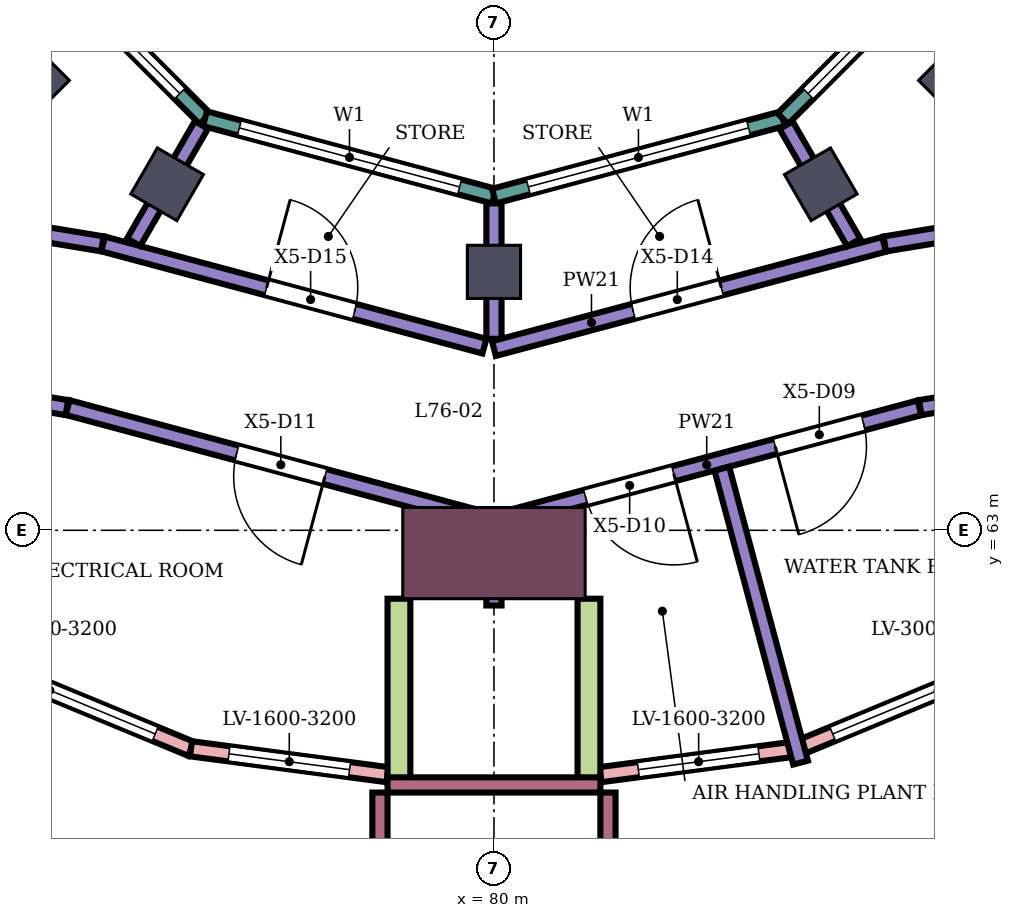
"""IFC4 building model, lengths in metres.
Left out: names, types, materials, properties, quantities, classifications, styles, units other than length and angle.
Written with IfcOpenShell. Run it as: python <this file> out.ifc"""

import sys

from ifc_helpers import new_model, si_unit, direction, frame, frame_2d, origin, origin_2d, place, context, subcontext, project, spatial, rectangle, extrude, element, fill, save


model = new_model("IFC4")
c1 = context("Model", 3, precision=1e-05, world=origin(), true_north=direction((0.0, 1.0)))
c2 = subcontext(c1, "Body", "Model", "MODEL_VIEW")
j1 = project(units=[si_unit("LENGTHUNIT", "METRE"), si_unit("PLANEANGLEUNIT", "RADIAN")], contexts=[c1])
p1 = place(None, origin())
s1 = spatial("IfcSite", under=j1, at=p1, CompositionType="ELEMENT")
p2 = place(p1, origin())
s2 = spatial("IfcBuilding", under=s1, at=p2, CompositionType="ELEMENT")
p3 = place(p2, frame((0.0, 0.0, 333.1)))
s3 = spatial("IfcBuildingStorey", under=s2, at=p3, CompositionType="ELEMENT", Elevation=333.1)
for number, where, z_axis, x_axis in (
    (1, (73.919, 68.919, 0.0), (0.0, 0.0, 1.0), (-0.707, -0.707, 0.0)),
    (2, (75.7, 67.552, 0.0), (0.0, 0.0, 1.0), (-0.5, -0.866, 0.0)),
    (3, (80.0, 66.4, 0.0), (0.0, 0.0, 1.0), (0.0, -1.0, 0.0)),
    (4, (84.3, 67.552, 0.0), (0.0, 0.0, 1.0), (0.5, -0.866, 0.0)),
    (5, (86.081, 68.919, 0.0), (0.0, 0.0, 1.0), (0.707, -0.707, 0.0)),
):
    element("IfcColumn", number, at=place(p3, frame(where, z_axis=z_axis, x_axis=x_axis)), inside=s3, PredefinedType="COLUMN", context=c2, shape_type="SweptSolid", body=[
        extrude(rectangle(XDim=0.7, YDim=0.7, at=origin_2d()), origin(), (0.0, 0.0, 1.0), 4.5),
    ])
p4 = place(p3, frame((80.0, 62.7, 0.0), z_axis=(0.0, 0.0, 1.0), x_axis=(0.0, -1.0, 0.0)))
e6 = element("IfcColumn", 6, at=p4, inside=s3, PredefinedType="COLUMN", context=c2, shape_type="SweptSolid", body=[
    extrude(rectangle(XDim=1.2, YDim=2.4, at=origin_2d()), origin(), (0.0, 0.0, 1.0), 4.5),
])
p5 = place(p3, frame((72.301, 61.664, 0.0), z_axis=(0.0, 0.0, 1.0), x_axis=(0.923858417842, -0.38273440371, 0.0)))
e7 = element("IfcWall", 7, at=p5, inside=s3, PredefinedType="NOTDEFINED", context=c2, shape_type="SweptSolid", body=[
    extrude(rectangle(XDim=4.02, YDim=0.2, at=frame_2d((2.01, 0.0))), origin(), (0.0, 0.0, 1.0), 4.5),
])
p6 = place(p5, frame((0.51, 0.0, 0.5)))
e8 = element("IfcOpeningElement", 8, at=p6, cuts=e7, PredefinedType="OPENING", context=c2, shape_type="SweptSolid", body=[
    extrude(rectangle(XDim=3.0, YDim=3.2, at=frame_2d((1.5, 1.6))), frame((0.0, 0.11, 0.0), z_axis=(0.0, -1.0, 0.0), x_axis=(1.0, 0.0, 0.0)), (0.0, 0.0, 1.0), 0.22),
])
p7 = place(p3, frame((76.014, 60.125, 0.0), z_axis=(0.0, 0.0, 1.0), x_axis=(0.991448878041, -0.130495678972, 0.0)))
e9 = element("IfcWall", 9, at=p7, inside=s3, PredefinedType="NOTDEFINED", context=c2, shape_type="SweptSolid", body=[
    extrude(rectangle(XDim=2.608, YDim=0.2, at=frame_2d((1.304, 0.0))), origin(), (0.0, 0.0, 1.0), 4.5),
])
p8 = place(p7, frame((0.504, 0.0, 0.5)))
e10 = element("IfcOpeningElement", 10, at=p8, cuts=e9, PredefinedType="OPENING", context=c2, shape_type="SweptSolid", body=[
    extrude(rectangle(XDim=1.6, YDim=3.2, at=frame_2d((0.8, 1.6))), frame((0.0, 0.11, 0.0), z_axis=(0.0, -1.0, 0.0), x_axis=(1.0, 0.0, 0.0)), (0.0, 0.0, 1.0), 0.22),
])
p9 = place(p3, frame((81.4, 59.785, 0.0), z_axis=(0.0, 0.0, 1.0), x_axis=(0.991448878041, 0.130495678972, 0.0)))
e11 = element("IfcWall", 11, at=p9, inside=s3, PredefinedType="NOTDEFINED", context=c2, shape_type="SweptSolid", body=[
    extrude(rectangle(XDim=2.608, YDim=0.2, at=frame_2d((1.304, 0.0))), origin(), (0.0, 0.0, 1.0), 4.5),
])
p10 = place(p9, frame((0.504, 0.0, 0.5)))
e12 = element("IfcOpeningElement", 12, at=p10, cuts=e11, PredefinedType="OPENING", context=c2, shape_type="SweptSolid", body=[
    extrude(rectangle(XDim=1.6, YDim=3.2, at=frame_2d((0.8, 1.6))), frame((0.0, 0.11, 0.0), z_axis=(0.0, -1.0, 0.0), x_axis=(1.0, 0.0, 0.0)), (0.0, 0.0, 1.0), 0.22),
])
p11 = place(p3, frame((83.986, 60.125, 0.0), z_axis=(0.0, 0.0, 1.0), x_axis=(0.923858417842, 0.38273440371, 0.0)))
e13 = element("IfcWall", 13, at=p11, inside=s3, PredefinedType="NOTDEFINED", context=c2, shape_type="SweptSolid", body=[
    extrude(rectangle(XDim=4.02, YDim=0.2, at=frame_2d((2.01, 0.0))), origin(), (0.0, 0.0, 1.0), 4.5),
])
p12 = place(p11, frame((0.51, 0.0, 0.5)))
e14 = element("IfcOpeningElement", 14, at=p12, cuts=e13, PredefinedType="OPENING", context=c2, shape_type="SweptSolid", body=[
    extrude(rectangle(XDim=3.0, YDim=3.2, at=frame_2d((1.5, 1.6))), frame((0.0, 0.11, 0.0), z_axis=(0.0, -1.0, 0.0), x_axis=(1.0, 0.0, 0.0)), (0.0, 0.0, 1.0), 0.22),
])
for number, where, z_axis, x_axis in (
    (15, (78.75, 62.1, 0.0), (0.0, 0.0, 1.0), (0.0, -1.0, 0.0)),
    (16, (81.25, 62.1, 0.0), (0.0, 0.0, 1.0), (0.0, -1.0, 0.0)),
):
    element("IfcWall", number, at=place(p3, frame(where, z_axis=z_axis, x_axis=x_axis)), inside=s3, PredefinedType="NOTDEFINED", context=c2, shape_type="SweptSolid", body=[
        extrude(rectangle(XDim=2.416, YDim=0.3, at=frame_2d((1.208, 0.0))), origin(), (0.0, 0.0, 1.0), 4.5),
    ])
p13 = place(p3, frame((73.415, 71.198, 0.0), z_axis=(0.0, 0.0, 1.0), x_axis=(0.707106781187, -0.707106781187, 0.0)))
e17 = element("IfcWall", 17, at=p13, inside=s3, PredefinedType="NOTDEFINED", context=c2, shape_type="SweptSolid", body=[
    extrude(rectangle(XDim=3.936, YDim=0.2, at=frame_2d((1.968, 0.0))), origin(), (0.0, 0.0, 1.0), 4.5),
])
p14 = place(p13, frame((0.468, 0.0, 0.9)))
e18 = element("IfcOpeningElement", 18, at=p14, cuts=e17, PredefinedType="OPENING", context=c2, shape_type="SweptSolid", body=[
    extrude(rectangle(XDim=3.0, YDim=2.3, at=frame_2d((1.5, 1.15))), frame((0.0, 0.11, 0.0), z_axis=(0.0, -1.0, 0.0), x_axis=(1.0, 0.0, 0.0)), (0.0, 0.0, 1.0), 0.22),
])
p15 = place(p3, frame((76.198, 68.415, 0.0), z_axis=(0.0, 0.0, 1.0), x_axis=(0.965933654434, -0.258789828301, 0.0)))
e19 = element("IfcWall", 19, at=p15, inside=s3, PredefinedType="NOTDEFINED", context=c2, shape_type="SweptSolid", body=[
    extrude(rectangle(XDim=3.936, YDim=0.2, at=frame_2d((1.968, 0.0))), origin(), (0.0, 0.0, 1.0), 4.5),
])
p16 = place(p15, frame((0.468, 0.0, 0.9)))
e20 = element("IfcOpeningElement", 20, at=p16, cuts=e19, PredefinedType="OPENING", context=c2, shape_type="SweptSolid", body=[
    extrude(rectangle(XDim=3.0, YDim=2.3, at=frame_2d((1.5, 1.15))), frame((0.0, 0.11, 0.0), z_axis=(0.0, -1.0, 0.0), x_axis=(1.0, 0.0, 0.0)), (0.0, 0.0, 1.0), 0.22),
])
p17 = place(p3, frame((80.0, 67.396, 0.0), z_axis=(0.0, 0.0, 1.0), x_axis=(0.965933654434, 0.258789828301, 0.0)))
e21 = element("IfcWall", 21, at=p17, inside=s3, PredefinedType="NOTDEFINED", context=c2, shape_type="SweptSolid", body=[
    extrude(rectangle(XDim=3.936, YDim=0.2, at=frame_2d((1.968, 0.0))), origin(), (0.0, 0.0, 1.0), 4.5),
])
p18 = place(p17, frame((0.468, 0.0, 0.9)))
e22 = element("IfcOpeningElement", 22, at=p18, cuts=e21, PredefinedType="OPENING", context=c2, shape_type="SweptSolid", body=[
    extrude(rectangle(XDim=3.0, YDim=2.3, at=frame_2d((1.5, 1.15))), frame((0.0, 0.11, 0.0), z_axis=(0.0, -1.0, 0.0), x_axis=(1.0, 0.0, 0.0)), (0.0, 0.0, 1.0), 0.22),
])
p19 = place(p3, frame((83.802, 68.415, 0.0), z_axis=(0.0, 0.0, 1.0), x_axis=(0.707106781187, 0.707106781187, 0.0)))
e23 = element("IfcWall", 23, at=p19, inside=s3, PredefinedType="NOTDEFINED", context=c2, shape_type="SweptSolid", body=[
    extrude(rectangle(XDim=3.936, YDim=0.2, at=frame_2d((1.968, 0.0))), origin(), (0.0, 0.0, 1.0), 4.5),
])
p20 = place(p19, frame((0.468, 0.0, 0.9)))
e24 = element("IfcOpeningElement", 24, at=p20, cuts=e23, PredefinedType="OPENING", context=c2, shape_type="SweptSolid", body=[
    extrude(rectangle(XDim=3.0, YDim=2.3, at=frame_2d((1.5, 1.15))), frame((0.0, 0.11, 0.0), z_axis=(0.0, -1.0, 0.0), x_axis=(1.0, 0.0, 0.0)), (0.0, 0.0, 1.0), 0.22),
])
p21 = place(p3, frame((88.836, 59.668, 0.0), z_axis=(0.0, 0.0, 1.0), x_axis=(-0.923884687805, -0.382670986147, 0.0)))
e25 = element("IfcWall", 25, at=p21, inside=s3, PredefinedType="PARAPET", context=c2, shape_type="SweptSolid", body=[
    extrude(rectangle(XDim=4.594, YDim=0.2, at=frame_2d((2.297, 0.0))), origin(), (0.0, 0.0, 1.0), 1.1),
])
p22 = place(p3, frame((81.5, 57.614, 0.0), z_axis=(0.0, 0.0, 1.0), x_axis=(0.0, 1.0, 0.0)))
e26 = element("IfcWall", 26, at=p22, inside=s3, PredefinedType="PARAPET", context=c2, shape_type="SweptSolid", body=[
    extrude(rectangle(XDim=1.936, YDim=0.2, at=frame_2d((0.968, 0.0))), origin(), (0.0, 0.0, 1.0), 1.1),
])
p23 = place(p3, frame((81.4, 59.65, 0.0), z_axis=(0.0, 0.0, 1.0), x_axis=(-1.0, 0.0, 0.0)))
e27 = element("IfcWall", 27, at=p23, inside=s3, PredefinedType="PARAPET", context=c2, shape_type="SweptSolid", body=[
    extrude(rectangle(XDim=2.8, YDim=0.2, at=frame_2d((1.4, 0.0))), origin(), (0.0, 0.0, 1.0), 1.1),
])
p24 = place(p3, frame((78.5, 59.55, 0.0), z_axis=(0.0, 0.0, 1.0), x_axis=(0.0, -1.0, 0.0)))
e28 = element("IfcWall", 28, at=p24, inside=s3, PredefinedType="PARAPET", context=c2, shape_type="SweptSolid", body=[
    extrude(rectangle(XDim=1.936, YDim=0.2, at=frame_2d((0.968, 0.0))), origin(), (0.0, 0.0, 1.0), 1.1),
])
p25 = place(p3, frame((75.407, 57.911, 0.0), z_axis=(0.0, 0.0, 1.0), x_axis=(-0.923884687805, 0.382670986147, 0.0)))
e29 = element("IfcWall", 29, at=p25, inside=s3, PredefinedType="PARAPET", context=c2, shape_type="SweptSolid", body=[
    extrude(rectangle(XDim=4.594, YDim=0.2, at=frame_2d((2.297, 0.0))), origin(), (0.0, 0.0, 1.0), 1.1),
])
p26 = place(p3, frame((71.716, 65.058, 0.0), z_axis=(0.0, 0.0, 1.0), x_axis=(0.986393923832, -0.164398987305, 0.0)))
e30 = element("IfcWall", 30, at=p26, inside=s3, PredefinedType="PARTITIONING", context=c2, shape_type="SweptSolid", body=[
    extrude(rectangle(XDim=2.703, YDim=0.2, at=frame_2d((1.352, 0.0))), origin(), (0.0, 0.0, 1.0), 4.05),
])
p27 = place(p26, frame((0.757, 0.0, 0.0)))
e31 = element("IfcOpeningElement", 31, at=p27, cuts=e30, PredefinedType="OPENING", context=c2, shape_type="SweptSolid", body=[
    extrude(rectangle(XDim=1.2, YDim=2.4, at=frame_2d((0.6, 1.2))), frame((0.0, 0.11, 0.0), z_axis=(0.0, -1.0, 0.0), x_axis=(1.0, 0.0, 0.0)), (0.0, 0.0, 1.0), 0.22),
])
p28 = place(p3, frame((72.1, 67.222, 0.0), z_axis=(0.0, 0.0, 1.0), x_axis=(0.986662669858, -0.162778302943, 0.0)))
e32 = element("IfcWall", 32, at=p28, inside=s3, PredefinedType="PARTITIONING", context=c2, shape_type="SweptSolid", body=[
    extrude(rectangle(XDim=2.785, YDim=0.2, at=frame_2d((1.393, 0.0))), origin(), (0.0, 0.0, 1.0), 4.05),
])
p29 = place(p28, frame((0.798, 0.0, 0.0)))
e33 = element("IfcOpeningElement", 33, at=p29, cuts=e32, PredefinedType="OPENING", context=c2, shape_type="SweptSolid", body=[
    extrude(rectangle(XDim=1.2, YDim=2.4, at=frame_2d((0.6, 1.2))), frame((0.0, 0.11, 0.0), z_axis=(0.0, -1.0, 0.0), x_axis=(1.0, 0.0, 0.0)), (0.0, 0.0, 1.0), 0.22),
])
p30 = place(p3, frame((74.392, 64.615, 0.0), z_axis=(0.0, 0.0, 1.0), x_axis=(0.965852483565, -0.259092608911, 0.0)))
e34 = element("IfcWall", 34, at=p30, inside=s3, PredefinedType="PARTITIONING", context=c2, shape_type="SweptSolid", body=[
    extrude(rectangle(XDim=5.716, YDim=0.2, at=frame_2d((2.858, 0.0))), origin(), (0.0, 0.0, 1.0), 4.05),
])
p31 = place(p30, frame((2.303, 0.0, 0.0)))
e35 = element("IfcOpeningElement", 35, at=p31, cuts=e34, PredefinedType="OPENING", context=c2, shape_type="SweptSolid", body=[
    extrude(rectangle(XDim=1.2, YDim=2.4, at=frame_2d((0.6, 1.2))), frame((0.0, 0.11, 0.0), z_axis=(0.0, -1.0, 0.0), x_axis=(1.0, 0.0, 0.0)), (0.0, 0.0, 1.0), 0.22),
])
p32 = place(p3, frame((74.858, 66.767, 0.0), z_axis=(0.0, 0.0, 1.0), x_axis=(0.965911957735, -0.258870797705, 0.0)))
e36 = element("IfcWall", 36, at=p32, inside=s3, PredefinedType="PARTITIONING", context=c2, shape_type="SweptSolid", body=[
    extrude(rectangle(XDim=5.194, YDim=0.2, at=frame_2d((2.597, 0.0))), origin(), (0.0, 0.0, 1.0), 4.05),
])
p33 = place(p32, frame((2.226, 0.0, 0.0)))
e37 = element("IfcOpeningElement", 37, at=p33, cuts=e36, PredefinedType="OPENING", context=c2, shape_type="SweptSolid", body=[
    extrude(rectangle(XDim=1.2, YDim=2.4, at=frame_2d((0.6, 1.2))), frame((0.0, 0.11, 0.0), z_axis=(0.0, -1.0, 0.0), x_axis=(1.0, 0.0, 0.0)), (0.0, 0.0, 1.0), 0.22),
])
p34 = place(p3, frame((75.26, 66.79, 0.0), z_axis=(0.0, 0.0, 1.0), x_axis=(0.500058459303, 0.865991649659, 0.0)))
e38 = element("IfcWall", 38, at=p34, inside=s3, PredefinedType="PARTITIONING", context=c2, shape_type="SweptSolid", body=[
    extrude(rectangle(XDim=1.782, YDim=0.2, at=frame_2d((0.891, 0.0))), origin(), (0.0, 0.0, 1.0), 4.05),
])
p35 = place(p3, frame((80.0, 62.011, 0.0), z_axis=(0.0, 0.0, 1.0), x_axis=(0.0, 1.0, 0.0)))
e39 = element("IfcWall", 39, at=p35, inside=s3, PredefinedType="PARTITIONING", context=c2, shape_type="SweptSolid", body=[
    extrude(rectangle(XDim=1.009, YDim=0.2, at=frame_2d((0.504, 0.0))), origin(), (0.0, 0.0, 1.0), 4.05),
])
p36 = place(p3, frame((80.0, 63.111, 0.0), z_axis=(0.0, 0.0, 1.0), x_axis=(0.965908374176, 0.258884168492, 0.0)))
e40 = element("IfcWall", 40, at=p36, inside=s3, PredefinedType="PARTITIONING", context=c2, shape_type="SweptSolid", body=[
    extrude(rectangle(XDim=5.796, YDim=0.2, at=frame_2d((2.898, 0.0))), origin(), (0.0, 0.0, 1.0), 4.05),
])
p37 = place(p36, frame((3.832, 0.0, 0.0)))
e41 = element("IfcOpeningElement", 41, at=p37, cuts=e40, PredefinedType="OPENING", context=c2, shape_type="SweptSolid", body=[
    extrude(rectangle(XDim=1.2, YDim=2.4, at=frame_2d((0.6, 1.2))), frame((0.0, 0.11, 0.0), z_axis=(0.0, -1.0, 0.0), x_axis=(1.0, 0.0, 0.0)), (0.0, 0.0, 1.0), 0.22),
])
p38 = place(p36, frame((1.248, 0.0, 0.0)))
e42 = element("IfcOpeningElement", 42, at=p38, cuts=e40, PredefinedType="OPENING", context=c2, shape_type="SweptSolid", body=[
    extrude(rectangle(XDim=1.2, YDim=2.4, at=frame_2d((0.6, 1.2))), frame((0.0, 0.11, 0.0), z_axis=(0.0, -1.0, 0.0), x_axis=(1.0, 0.0, 0.0)), (0.0, 0.0, 1.0), 0.22),
])
p39 = place(p3, frame((80.0, 65.519, 0.0), z_axis=(0.0, 0.0, 1.0), x_axis=(0.0, 1.0, 0.0)))
e43 = element("IfcWall", 43, at=p39, inside=s3, PredefinedType="PARTITIONING", context=c2, shape_type="SweptSolid", body=[
    extrude(rectangle(XDim=1.782, YDim=0.2, at=frame_2d((0.891, 0.0))), origin(), (0.0, 0.0, 1.0), 4.05),
])
p40 = place(p3, frame((80.0, 65.39, 0.0), z_axis=(0.0, 0.0, 1.0), x_axis=(0.966134201203, 0.258040123363, 0.0)))
e44 = element("IfcWall", 44, at=p40, inside=s3, PredefinedType="PARTITIONING", context=c2, shape_type="SweptSolid", body=[
    extrude(rectangle(XDim=5.313, YDim=0.2, at=frame_2d((2.657, 0.0))), origin(), (0.0, 0.0, 1.0), 4.05),
])
p41 = place(p40, frame((1.897, 0.0, 0.0)))
e45 = element("IfcOpeningElement", 45, at=p41, cuts=e44, PredefinedType="OPENING", context=c2, shape_type="SweptSolid", body=[
    extrude(rectangle(XDim=1.2, YDim=2.4, at=frame_2d((0.6, 1.2))), frame((0.0, 0.11, 0.0), z_axis=(0.0, -1.0, 0.0), x_axis=(1.0, 0.0, 0.0)), (0.0, 0.0, 1.0), 0.22),
])
p42 = place(p3, frame((82.998, 63.811, 0.0), z_axis=(0.0, 0.0, 1.0), x_axis=(0.258759455785, -0.965941791228, 0.0)))
e46 = element("IfcWall", 46, at=p42, inside=s3, PredefinedType="PARTITIONING", context=c2, shape_type="SweptSolid", body=[
    extrude(rectangle(XDim=4.003, YDim=0.2, at=frame_2d((2.001, 0.0))), origin(), (0.0, 0.0, 1.0), 4.05),
])
p43 = place(p3, frame((83.843, 68.33, 0.0), z_axis=(0.0, 0.0, 1.0), x_axis=(0.499631524239, -0.866238038871, 0.0)))
e47 = element("IfcWall", 47, at=p43, inside=s3, PredefinedType="PARTITIONING", context=c2, shape_type="SweptSolid", body=[
    extrude(rectangle(XDim=1.782, YDim=0.2, at=frame_2d((0.891, 0.0))), origin(), (0.0, 0.0, 1.0), 4.05),
])
p44 = place(p3, frame((85.142, 66.767, 0.0), z_axis=(0.0, 0.0, 1.0), x_axis=(0.986671073711, 0.16272735573, 0.0)))
e48 = element("IfcWall", 48, at=p44, inside=s3, PredefinedType="PARTITIONING", context=c2, shape_type="SweptSolid", body=[
    extrude(rectangle(XDim=2.795, YDim=0.2, at=frame_2d((1.397, 0.0))), origin(), (0.0, 0.0, 1.0), 4.05),
])
p45 = place(p44, frame((0.798, 0.0, 0.0)))
e49 = element("IfcOpeningElement", 49, at=p45, cuts=e48, PredefinedType="OPENING", context=c2, shape_type="SweptSolid", body=[
    extrude(rectangle(XDim=1.2, YDim=2.4, at=frame_2d((0.6, 1.2))), frame((0.0, 0.11, 0.0), z_axis=(0.0, -1.0, 0.0), x_axis=(1.0, 0.0, 0.0)), (0.0, 0.0, 1.0), 0.22),
])
p46 = place(p3, frame((85.608, 64.614, 0.0), z_axis=(0.0, 0.0, 1.0), x_axis=(0.986607186374, 0.163114253806, 0.0)))
e50 = element("IfcWall", 50, at=p46, inside=s3, PredefinedType="PARTITIONING", context=c2, shape_type="SweptSolid", body=[
    extrude(rectangle(XDim=2.712, YDim=0.2, at=frame_2d((1.356, 0.0))), origin(), (0.0, 0.0, 1.0), 4.05),
])
p47 = place(p6, origin())
e51 = element("IfcWindow", 51, at=p47, inside=s3, PartitioningType="SINGLE_PANEL", PredefinedType="USERDEFINED", context=c2, shape_type="SweptSolid", body=[
    extrude(rectangle(XDim=3.0, YDim=3.2, at=frame_2d((1.5, 1.6))), frame((0.0, 0.03, 0.0), z_axis=(0.0, -1.0, 0.0), x_axis=(1.0, 0.0, 0.0)), (0.0, 0.0, 1.0), 0.06),
])
fill(e8, e51)
p48 = place(p8, origin())
e52 = element("IfcWindow", 52, at=p48, inside=s3, PartitioningType="SINGLE_PANEL", PredefinedType="USERDEFINED", context=c2, shape_type="SweptSolid", body=[
    extrude(rectangle(XDim=1.6, YDim=3.2, at=frame_2d((0.8, 1.6))), frame((0.0, 0.03, 0.0), z_axis=(0.0, -1.0, 0.0), x_axis=(1.0, 0.0, 0.0)), (0.0, 0.0, 1.0), 0.06),
])
fill(e10, e52)
p49 = place(p10, origin())
e53 = element("IfcWindow", 53, at=p49, inside=s3, PartitioningType="SINGLE_PANEL", PredefinedType="USERDEFINED", context=c2, shape_type="SweptSolid", body=[
    extrude(rectangle(XDim=1.6, YDim=3.2, at=frame_2d((0.8, 1.6))), frame((0.0, 0.03, 0.0), z_axis=(0.0, -1.0, 0.0), x_axis=(1.0, 0.0, 0.0)), (0.0, 0.0, 1.0), 0.06),
])
fill(e12, e53)
p50 = place(p12, origin())
e54 = element("IfcWindow", 54, at=p50, inside=s3, PartitioningType="SINGLE_PANEL", PredefinedType="USERDEFINED", context=c2, shape_type="SweptSolid", body=[
    extrude(rectangle(XDim=3.0, YDim=3.2, at=frame_2d((1.5, 1.6))), frame((0.0, 0.03, 0.0), z_axis=(0.0, -1.0, 0.0), x_axis=(1.0, 0.0, 0.0)), (0.0, 0.0, 1.0), 0.06),
])
fill(e14, e54)
p51 = place(p14, origin())
e55 = element("IfcWindow", 55, at=p51, inside=s3, PartitioningType="SINGLE_PANEL", PredefinedType="WINDOW", context=c2, shape_type="SweptSolid", body=[
    extrude(rectangle(XDim=3.0, YDim=2.3, at=frame_2d((1.5, 1.15))), frame((0.0, 0.03, 0.0), z_axis=(0.0, -1.0, 0.0), x_axis=(1.0, 0.0, 0.0)), (0.0, 0.0, 1.0), 0.06),
])
fill(e18, e55)
p52 = place(p16, origin())
e56 = element("IfcWindow", 56, at=p52, inside=s3, PartitioningType="SINGLE_PANEL", PredefinedType="WINDOW", context=c2, shape_type="SweptSolid", body=[
    extrude(rectangle(XDim=3.0, YDim=2.3, at=frame_2d((1.5, 1.15))), frame((0.0, 0.03, 0.0), z_axis=(0.0, -1.0, 0.0), x_axis=(1.0, 0.0, 0.0)), (0.0, 0.0, 1.0), 0.06),
])
fill(e20, e56)
p53 = place(p18, origin())
e57 = element("IfcWindow", 57, at=p53, inside=s3, PartitioningType="SINGLE_PANEL", PredefinedType="WINDOW", context=c2, shape_type="SweptSolid", body=[
    extrude(rectangle(XDim=3.0, YDim=2.3, at=frame_2d((1.5, 1.15))), frame((0.0, 0.03, 0.0), z_axis=(0.0, -1.0, 0.0), x_axis=(1.0, 0.0, 0.0)), (0.0, 0.0, 1.0), 0.06),
])
fill(e22, e57)
p54 = place(p20, origin())
e58 = element("IfcWindow", 58, at=p54, inside=s3, PartitioningType="SINGLE_PANEL", PredefinedType="WINDOW", context=c2, shape_type="SweptSolid", body=[
    extrude(rectangle(XDim=3.0, YDim=2.3, at=frame_2d((1.5, 1.15))), frame((0.0, 0.03, 0.0), z_axis=(0.0, -1.0, 0.0), x_axis=(1.0, 0.0, 0.0)), (0.0, 0.0, 1.0), 0.06),
])
fill(e24, e58)
p55 = place(p37, frame((1.2, 0.0, 0.0), z_axis=(0.0, 0.0, 1.0), x_axis=(-1.0, 0.0, 0.0)))
e59 = element("IfcDoor", 59, at=p55, inside=s3, OperationType="SINGLE_SWING_RIGHT", PredefinedType="DOOR", context=c2, shape_type="SweptSolid", body=[
    extrude(rectangle(XDim=1.2, YDim=2.4, at=frame_2d((0.6, 1.2))), frame((0.0, 0.025, 0.0), z_axis=(0.0, -1.0, 0.0), x_axis=(1.0, 0.0, 0.0)), (0.0, 0.0, 1.0), 0.05),
])
fill(e41, e59)
p56 = place(p38, frame((1.2, 0.0, 0.0), z_axis=(0.0, 0.0, 1.0), x_axis=(-1.0, 0.0, 0.0)))
e60 = element("IfcDoor", 60, at=p56, inside=s3, OperationType="SINGLE_SWING_LEFT", PredefinedType="DOOR", context=c2, shape_type="SweptSolid", body=[
    extrude(rectangle(XDim=1.2, YDim=2.4, at=frame_2d((0.6, 1.2))), frame((0.0, 0.025, 0.0), z_axis=(0.0, -1.0, 0.0), x_axis=(1.0, 0.0, 0.0)), (0.0, 0.0, 1.0), 0.05),
])
fill(e42, e60)
p57 = place(p31, frame((1.2, 0.0, 0.0), z_axis=(0.0, 0.0, 1.0), x_axis=(-1.0, 0.0, 0.0)))
e61 = element("IfcDoor", 61, at=p57, inside=s3, OperationType="SINGLE_SWING_LEFT", PredefinedType="DOOR", context=c2, shape_type="SweptSolid", body=[
    extrude(rectangle(XDim=1.2, YDim=2.4, at=frame_2d((0.6, 1.2))), frame((0.0, 0.025, 0.0), z_axis=(0.0, -1.0, 0.0), x_axis=(1.0, 0.0, 0.0)), (0.0, 0.0, 1.0), 0.05),
])
fill(e35, e61)
p58 = place(p41, origin())
e62 = element("IfcDoor", 62, at=p58, inside=s3, OperationType="SINGLE_SWING_RIGHT", PredefinedType="DOOR", context=c2, shape_type="SweptSolid", body=[
    extrude(rectangle(XDim=1.2, YDim=2.4, at=frame_2d((0.6, 1.2))), frame((0.0, 0.025, 0.0), z_axis=(0.0, -1.0, 0.0), x_axis=(1.0, 0.0, 0.0)), (0.0, 0.0, 1.0), 0.05),
])
fill(e45, e62)
p59 = place(p33, origin())
e63 = element("IfcDoor", 63, at=p59, inside=s3, OperationType="SINGLE_SWING_LEFT", PredefinedType="DOOR", context=c2, shape_type="SweptSolid", body=[
    extrude(rectangle(XDim=1.2, YDim=2.4, at=frame_2d((0.6, 1.2))), frame((0.0, 0.025, 0.0), z_axis=(0.0, -1.0, 0.0), x_axis=(1.0, 0.0, 0.0)), (0.0, 0.0, 1.0), 0.05),
])
fill(e37, e63)
save(model, sys.argv[1])
